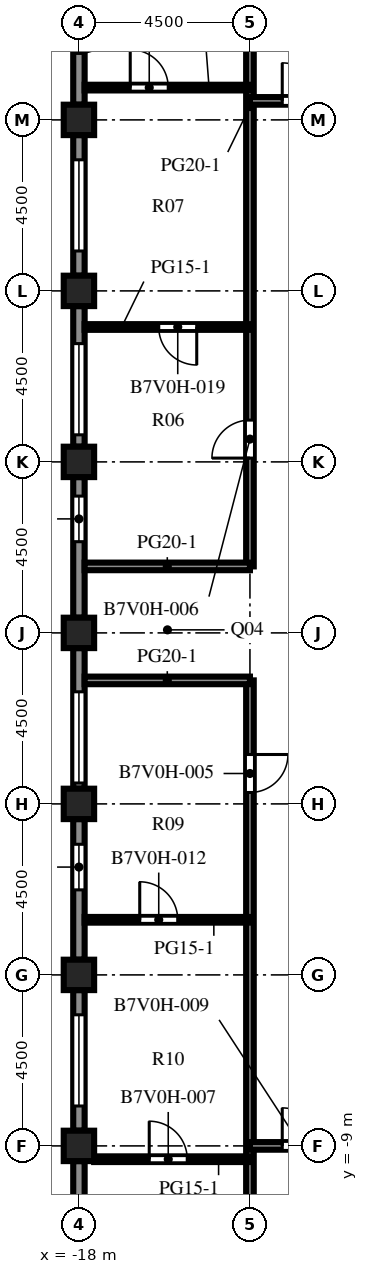
"""IFC4 building model, lengths in metres.
Left out: names, types, materials, properties, quantities, classifications, styles, units other than length and angle.
Written with IfcOpenShell. Run it as: python <this file> out.ifc"""

import sys

from ifc_helpers import new_model, si_unit, direction, frame, frame_2d, origin, origin_2d, place, context, subcontext, project, spatial, rectangle, extrude, element, fill, save


model = new_model("IFC4")
c1 = context("Model", 3, precision=1e-05, world=origin(), true_north=direction((0.0, 1.0)))
c2 = subcontext(c1, "Body", "Model", "MODEL_VIEW")
j1 = project(units=[si_unit("LENGTHUNIT", "METRE"), si_unit("PLANEANGLEUNIT", "RADIAN")], contexts=[c1])
p1 = place(None, origin())
s1 = spatial("IfcSite", under=j1, at=p1, CompositionType="ELEMENT")
p2 = place(p1, origin())
s2 = spatial("IfcBuilding", under=s1, at=p2, CompositionType="ELEMENT")
p3 = place(p2, frame((0.0, 0.0, 231.6)))
s3 = spatial("IfcBuildingStorey", under=s2, at=p3, CompositionType="ELEMENT", Elevation=231.6)
for number, where, z_axis, x_axis in (
    (1, (-18.0, -9.0, 0.0), (0.0, 0.0, 1.0), (1.0, 0.0, 0.0)),
    (2, (-18.0, -4.5, 0.0), (0.0, 0.0, 1.0), (1.0, 0.0, 0.0)),
    (3, (-18.0, 0.0, 0.0), (0.0, 0.0, 1.0), (1.0, 0.0, 0.0)),
    (4, (-18.0, 4.5, 0.0), (0.0, 0.0, 1.0), (1.0, 0.0, 0.0)),
    (5, (-18.0, 9.0, 0.0), (0.0, 0.0, 1.0), (1.0, 0.0, 0.0)),
    (6, (-18.0, 13.5, 0.0), (0.0, 0.0, 1.0), (1.0, 0.0, 0.0)),
    (7, (-18.0, 18.0, 0.0), (0.0, 0.0, 1.0), (1.0, 0.0, 0.0)),
):
    element("IfcColumn", number, at=place(p3, frame(where, z_axis=z_axis, x_axis=x_axis)), inside=s3, PredefinedType="COLUMN", context=c2, shape_type="SweptSolid", body=[
        extrude(rectangle(XDim=0.8, YDim=0.8, at=origin_2d()), origin(), (0.0, 0.0, 1.0), 4.1),
    ])
p4 = place(p3, frame((-18.0, 18.4, 0.0), z_axis=(0.0, 0.0, 1.0), x_axis=(0.0, 1.0, 0.0)))
e8 = element("IfcWall", 8, at=p4, inside=s3, PredefinedType="SOLIDWALL", context=c2, shape_type="SweptSolid", body=[
    extrude(rectangle(XDim=3.7, YDim=0.3, at=frame_2d((1.85, 0.0))), origin(), (0.0, 0.0, 1.0), 2.85),
])
p5 = place(p4, frame((1.35, 0.0, 0.0)))
e9 = element("IfcOpeningElement", 9, at=p5, cuts=e8, PredefinedType="OPENING", context=c2, shape_type="SweptSolid", body=[
    extrude(rectangle(XDim=1.0, YDim=2.2, at=frame_2d((0.5, 1.1))), frame((0.0, 0.16, 0.0), z_axis=(0.0, -1.0, 0.0), x_axis=(1.0, 0.0, 0.0)), (0.0, 0.0, 1.0), 0.32),
])
p6 = place(p3, frame((-18.0, 13.9, 0.0), z_axis=(0.0, 0.0, 1.0), x_axis=(0.0, 1.0, 0.0)))
e10 = element("IfcWall", 10, at=p6, inside=s3, PredefinedType="SOLIDWALL", context=c2, shape_type="SweptSolid", body=[
    extrude(rectangle(XDim=3.7, YDim=0.3, at=frame_2d((1.85, 0.0))), origin(), (0.0, 0.0, 1.0), 2.85),
])
p7 = place(p6, frame((0.65, 0.0, 0.8)))
e11 = element("IfcOpeningElement", 11, at=p7, cuts=e10, PredefinedType="OPENING", context=c2, shape_type="SweptSolid", body=[
    extrude(rectangle(XDim=2.4, YDim=1.7, at=frame_2d((1.2, 0.85))), frame((0.0, 0.16, 0.0), z_axis=(0.0, -1.0, 0.0), x_axis=(1.0, 0.0, 0.0)), (0.0, 0.0, 1.0), 0.32),
])
p8 = place(p3, frame((-18.0, 9.4, 0.0), z_axis=(0.0, 0.0, 1.0), x_axis=(0.0, 1.0, 0.0)))
e12 = element("IfcWall", 12, at=p8, inside=s3, PredefinedType="SOLIDWALL", context=c2, shape_type="SweptSolid", body=[
    extrude(rectangle(XDim=3.7, YDim=0.3, at=frame_2d((1.85, 0.0))), origin(), (0.0, 0.0, 1.0), 2.85),
])
p9 = place(p8, frame((0.312, 0.0, 0.8)))
e13 = element("IfcOpeningElement", 13, at=p9, cuts=e12, PredefinedType="OPENING", context=c2, shape_type="SweptSolid", body=[
    extrude(rectangle(XDim=2.4, YDim=1.7, at=frame_2d((1.2, 0.85))), frame((0.0, 0.16, 0.0), z_axis=(0.0, -1.0, 0.0), x_axis=(1.0, 0.0, 0.0)), (0.0, 0.0, 1.0), 0.32),
])
p10 = place(p3, frame((-18.0, 4.9, 0.0), z_axis=(0.0, 0.0, 1.0), x_axis=(0.0, 1.0, 0.0)))
e14 = element("IfcWall", 14, at=p10, inside=s3, PredefinedType="SOLIDWALL", context=c2, shape_type="SweptSolid", body=[
    extrude(rectangle(XDim=3.7, YDim=0.3, at=frame_2d((1.85, 0.0))), origin(), (0.0, 0.0, 1.0), 2.85),
])
p11 = place(p10, frame((2.0, 0.0, 0.8)))
e15 = element("IfcOpeningElement", 15, at=p11, cuts=e14, PredefinedType="OPENING", context=c2, shape_type="SweptSolid", body=[
    extrude(rectangle(XDim=1.2, YDim=1.7, at=frame_2d((0.6, 0.85))), frame((0.0, 0.16, 0.0), z_axis=(0.0, -1.0, 0.0), x_axis=(1.0, 0.0, 0.0)), (0.0, 0.0, 1.0), 0.32),
])
p12 = place(p3, frame((-18.0, 0.4, 0.0), z_axis=(0.0, 0.0, 1.0), x_axis=(0.0, 1.0, 0.0)))
e16 = element("IfcWall", 16, at=p12, inside=s3, PredefinedType="SOLIDWALL", context=c2, shape_type="SweptSolid", body=[
    extrude(rectangle(XDim=3.7, YDim=0.3, at=frame_2d((1.85, 0.0))), origin(), (0.0, 0.0, 1.0), 2.85),
])
p13 = place(p12, frame((0.15, 0.0, 0.8)))
e17 = element("IfcOpeningElement", 17, at=p13, cuts=e16, PredefinedType="OPENING", context=c2, shape_type="SweptSolid", body=[
    extrude(rectangle(XDim=2.4, YDim=1.7, at=frame_2d((1.2, 0.85))), frame((0.0, 0.16, 0.0), z_axis=(0.0, -1.0, 0.0), x_axis=(1.0, 0.0, 0.0)), (0.0, 0.0, 1.0), 0.32),
])
p14 = place(p3, frame((-18.0, -4.1, 0.0), z_axis=(0.0, 0.0, 1.0), x_axis=(0.0, 1.0, 0.0)))
e18 = element("IfcWall", 18, at=p14, inside=s3, PredefinedType="SOLIDWALL", context=c2, shape_type="SweptSolid", body=[
    extrude(rectangle(XDim=3.7, YDim=0.3, at=frame_2d((1.85, 0.0))), origin(), (0.0, 0.0, 1.0), 2.85),
])
p15 = place(p14, frame((1.837, 0.0, 0.8)))
e19 = element("IfcOpeningElement", 19, at=p15, cuts=e18, PredefinedType="OPENING", context=c2, shape_type="SweptSolid", body=[
    extrude(rectangle(XDim=1.2, YDim=1.7, at=frame_2d((0.6, 0.85))), frame((0.0, 0.16, 0.0), z_axis=(0.0, -1.0, 0.0), x_axis=(1.0, 0.0, 0.0)), (0.0, 0.0, 1.0), 0.32),
])
p16 = place(p3, frame((-18.0, -8.6, 0.0), z_axis=(0.0, 0.0, 1.0), x_axis=(0.0, 1.0, 0.0)))
e20 = element("IfcWall", 20, at=p16, inside=s3, PredefinedType="SOLIDWALL", context=c2, shape_type="SweptSolid", body=[
    extrude(rectangle(XDim=3.7, YDim=0.3, at=frame_2d((1.85, 0.0))), origin(), (0.0, 0.0, 1.0), 2.85),
])
p17 = place(p16, frame((0.65, 0.0, 0.8)))
e21 = element("IfcOpeningElement", 21, at=p17, cuts=e20, PredefinedType="OPENING", context=c2, shape_type="SweptSolid", body=[
    extrude(rectangle(XDim=2.4, YDim=1.7, at=frame_2d((1.2, 0.85))), frame((0.0, 0.16, 0.0), z_axis=(0.0, -1.0, 0.0), x_axis=(1.0, 0.0, 0.0)), (0.0, 0.0, 1.0), 0.32),
])
p18 = place(p3, frame((-18.0, -13.1, 0.0), z_axis=(0.0, 0.0, 1.0), x_axis=(0.0, 1.0, 0.0)))
e22 = element("IfcWall", 22, at=p18, inside=s3, PredefinedType="SOLIDWALL", context=c2, shape_type="SweptSolid", body=[
    extrude(rectangle(XDim=3.7, YDim=0.3, at=frame_2d((1.85, 0.0))), origin(), (0.0, 0.0, 1.0), 2.85),
])
p19 = place(p18, frame((1.35, 0.0, 0.0)))
e23 = element("IfcOpeningElement", 23, at=p19, cuts=e22, PredefinedType="OPENING", context=c2, shape_type="SweptSolid", body=[
    extrude(rectangle(XDim=1.0, YDim=2.2, at=frame_2d((0.5, 1.1))), frame((0.0, 0.16, 0.0), z_axis=(0.0, -1.0, 0.0), x_axis=(1.0, 0.0, 0.0)), (0.0, 0.0, 1.0), 0.32),
])
p20 = place(p3, frame((-13.5, -22.077, 0.0), z_axis=(0.0, 0.0, 1.0), x_axis=(0.0, 1.0, 0.0)))
e24 = element("IfcWall", 24, at=p20, inside=s3, PredefinedType="PARTITIONING", context=c2, shape_type="SweptSolid", body=[
    extrude(rectangle(XDim=25.327, YDim=0.2, at=frame_2d((12.664, 0.0))), origin(), (0.0, 0.0, 1.0), 3.65),
])
p21 = place(p20, frame((22.377, 0.0, 0.0)))
e25 = element("IfcOpeningElement", 25, at=p21, cuts=e24, PredefinedType="OPENING", context=c2, shape_type="SweptSolid", body=[
    extrude(rectangle(XDim=1.0, YDim=2.1, at=frame_2d((0.5, 1.05))), frame((0.0, 0.11, 0.0), z_axis=(0.0, -1.0, 0.0), x_axis=(1.0, 0.0, 0.0)), (0.0, 0.0, 1.0), 0.22),
])
p22 = place(p3, frame((-13.5, 6.25, 0.0), z_axis=(0.0, 0.0, 1.0), x_axis=(0.0, 1.0, 0.0)))
e26 = element("IfcWall", 26, at=p22, inside=s3, PredefinedType="PARTITIONING", context=c2, shape_type="SweptSolid", body=[
    extrude(rectangle(XDim=20.35, YDim=0.2, at=frame_2d((10.175, 0.0))), origin(), (0.0, 0.0, 1.0), 3.65),
])
p23 = place(p22, frame((2.85, 0.0, 0.0)))
e27 = element("IfcOpeningElement", 27, at=p23, cuts=e26, PredefinedType="OPENING", context=c2, shape_type="SweptSolid", body=[
    extrude(rectangle(XDim=1.0, YDim=2.1, at=frame_2d((0.5, 1.05))), frame((0.0, 0.11, 0.0), z_axis=(0.0, -1.0, 0.0), x_axis=(1.0, 0.0, 0.0)), (0.0, 0.0, 1.0), 0.22),
])
p24 = place(p3, frame((-13.5, -9.35, 0.0), z_axis=(0.0, 0.0, 1.0), x_axis=(-1.0, 0.0, 0.0)))
e28 = element("IfcWall", 28, at=p24, inside=s3, PredefinedType="PARTITIONING", context=c2, shape_type="SweptSolid", body=[
    extrude(rectangle(XDim=4.1, YDim=0.15, at=frame_2d((2.05, 0.0))), origin(), (0.0, 0.0, 1.0), 3.65),
])
p25 = place(p24, frame((1.65, 0.0, 0.0)))
e29 = element("IfcOpeningElement", 29, at=p25, cuts=e28, PredefinedType="OPENING", context=c2, shape_type="SweptSolid", body=[
    extrude(rectangle(XDim=1.0, YDim=2.1, at=frame_2d((0.5, 1.05))), frame((0.0, 0.085, 0.0), z_axis=(0.0, -1.0, 0.0), x_axis=(1.0, 0.0, 0.0)), (0.0, 0.0, 1.0), 0.17),
])
p26 = place(p3, frame((-10.5, -9.0, 0.0), z_axis=(0.0, 0.0, 1.0), x_axis=(-1.0, 0.0, 0.0)))
e30 = element("IfcWall", 30, at=p26, inside=s3, PredefinedType="PARTITIONING", context=c2, shape_type="SweptSolid", body=[
    extrude(rectangle(XDim=3.0, YDim=0.2, at=frame_2d((1.5, 0.0))), origin(), (0.0, 0.0, 1.0), 3.65),
])
p27 = place(p26, frame((1.15, 0.0, 0.0)))
e31 = element("IfcOpeningElement", 31, at=p27, cuts=e30, PredefinedType="OPENING", context=c2, shape_type="SweptSolid", body=[
    extrude(rectangle(XDim=1.0, YDim=2.1, at=frame_2d((0.5, 1.05))), frame((0.0, 0.11, 0.0), z_axis=(0.0, -1.0, 0.0), x_axis=(1.0, 0.0, 0.0)), (0.0, 0.0, 1.0), 0.22),
])
p28 = place(p3, frame((-13.5, -3.05, 0.0), z_axis=(0.0, 0.0, 1.0), x_axis=(-1.0, 0.0, 0.0)))
e32 = element("IfcWall", 32, at=p28, inside=s3, PredefinedType="PARTITIONING", context=c2, shape_type="SweptSolid", body=[
    extrude(rectangle(XDim=4.35, YDim=0.15, at=frame_2d((2.175, 0.0))), origin(), (0.0, 0.0, 1.0), 3.65),
])
p29 = place(p28, frame((1.9, 0.0, 0.0)))
e33 = element("IfcOpeningElement", 33, at=p29, cuts=e32, PredefinedType="OPENING", context=c2, shape_type="SweptSolid", body=[
    extrude(rectangle(XDim=1.0, YDim=2.1, at=frame_2d((0.5, 1.05))), frame((0.0, 0.085, 0.0), z_axis=(0.0, -1.0, 0.0), x_axis=(1.0, 0.0, 0.0)), (0.0, 0.0, 1.0), 0.17),
])
for number, where, z_axis, x_axis in (
    (34, (-17.85, 3.25, 0.0), (0.0, 0.0, 1.0), (1.0, 0.0, 0.0)),
    (35, (-17.85, 6.25, 0.0), (0.0, 0.0, 1.0), (1.0, 0.0, 0.0)),
):
    element("IfcWall", number, at=place(p3, frame(where, z_axis=z_axis, x_axis=x_axis)), inside=s3, PredefinedType="PARTITIONING", context=c2, shape_type="SweptSolid", body=[
        extrude(rectangle(XDim=4.35, YDim=0.2, at=frame_2d((2.175, 0.0))), origin(), (0.0, 0.0, 1.0), 3.65),
    ])
p30 = place(p3, frame((-17.85, 12.55, 0.0), z_axis=(0.0, 0.0, 1.0), x_axis=(1.0, 0.0, 0.0)))
e36 = element("IfcWall", 36, at=p30, inside=s3, PredefinedType="PARTITIONING", context=c2, shape_type="SweptSolid", body=[
    extrude(rectangle(XDim=4.35, YDim=0.15, at=frame_2d((2.175, 0.0))), origin(), (0.0, 0.0, 1.0), 3.65),
])
p31 = place(p30, frame((1.95, 0.0, 0.0)))
e37 = element("IfcOpeningElement", 37, at=p31, cuts=e36, PredefinedType="OPENING", context=c2, shape_type="SweptSolid", body=[
    extrude(rectangle(XDim=1.0, YDim=2.1, at=frame_2d((0.5, 1.05))), frame((0.0, 0.085, 0.0), z_axis=(0.0, -1.0, 0.0), x_axis=(1.0, 0.0, 0.0)), (0.0, 0.0, 1.0), 0.17),
])
p32 = place(p3, frame((-13.5, 18.5, 0.0), z_axis=(0.0, 0.0, 1.0), x_axis=(1.0, 0.0, 0.0)))
e38 = element("IfcWall", 38, at=p32, inside=s3, PredefinedType="PARTITIONING", context=c2, shape_type="SweptSolid", body=[
    extrude(rectangle(XDim=3.0, YDim=0.2, at=frame_2d((1.5, 0.0))), origin(), (0.0, 0.0, 1.0), 3.65),
])
p33 = place(p32, frame((0.85, 0.0, 0.0)))
e39 = element("IfcOpeningElement", 39, at=p33, cuts=e38, PredefinedType="OPENING", context=c2, shape_type="SweptSolid", body=[
    extrude(rectangle(XDim=1.0, YDim=2.1, at=frame_2d((0.5, 1.05))), frame((0.0, 0.11, 0.0), z_axis=(0.0, -1.0, 0.0), x_axis=(1.0, 0.0, 0.0)), (0.0, 0.0, 1.0), 0.22),
])
p34 = place(p3, frame((-17.85, 18.85, 0.0), z_axis=(0.0, 0.0, 1.0), x_axis=(1.0, 0.0, 0.0)))
e40 = element("IfcWall", 40, at=p34, inside=s3, PredefinedType="PARTITIONING", context=c2, shape_type="SweptSolid", body=[
    extrude(rectangle(XDim=4.35, YDim=0.15, at=frame_2d((2.175, 0.0))), origin(), (0.0, 0.0, 1.0), 3.65),
])
p35 = place(p34, frame((1.2, 0.0, 0.0)))
e41 = element("IfcOpeningElement", 41, at=p35, cuts=e40, PredefinedType="OPENING", context=c2, shape_type="SweptSolid", body=[
    extrude(rectangle(XDim=1.0, YDim=2.1, at=frame_2d((0.5, 1.05))), frame((0.0, 0.085, 0.0), z_axis=(0.0, -1.0, 0.0), x_axis=(1.0, 0.0, 0.0)), (0.0, 0.0, 1.0), 0.17),
])
p36 = place(p5, origin())
e42 = element("IfcDoor", 42, at=p36, inside=s3, OperationType="SINGLE_SWING_RIGHT", PredefinedType="DOOR", context=c2, shape_type="SweptSolid", body=[
    extrude(rectangle(XDim=1.0, YDim=2.2, at=frame_2d((0.5, 1.1))), frame((0.0, 0.025, 0.0), z_axis=(0.0, -1.0, 0.0), x_axis=(1.0, 0.0, 0.0)), (0.0, 0.0, 1.0), 0.05),
])
fill(e9, e42)
p37 = place(p7, origin())
e43 = element("IfcWindow", 43, at=p37, inside=s3, PartitioningType="SINGLE_PANEL", PredefinedType="WINDOW", context=c2, shape_type="SweptSolid", body=[
    extrude(rectangle(XDim=2.4, YDim=1.7, at=frame_2d((1.2, 0.85))), frame((0.0, 0.03, 0.0), z_axis=(0.0, -1.0, 0.0), x_axis=(1.0, 0.0, 0.0)), (0.0, 0.0, 1.0), 0.06),
])
fill(e11, e43)
p38 = place(p9, origin())
e44 = element("IfcWindow", 44, at=p38, inside=s3, PartitioningType="SINGLE_PANEL", PredefinedType="WINDOW", context=c2, shape_type="SweptSolid", body=[
    extrude(rectangle(XDim=2.4, YDim=1.7, at=frame_2d((1.2, 0.85))), frame((0.0, 0.03, 0.0), z_axis=(0.0, -1.0, 0.0), x_axis=(1.0, 0.0, 0.0)), (0.0, 0.0, 1.0), 0.06),
])
fill(e13, e44)
p39 = place(p11, origin())
e45 = element("IfcWindow", 45, at=p39, inside=s3, PartitioningType="SINGLE_PANEL", PredefinedType="WINDOW", context=c2, shape_type="SweptSolid", body=[
    extrude(rectangle(XDim=1.2, YDim=1.7, at=frame_2d((0.6, 0.85))), frame((0.0, 0.03, 0.0), z_axis=(0.0, -1.0, 0.0), x_axis=(1.0, 0.0, 0.0)), (0.0, 0.0, 1.0), 0.06),
])
fill(e15, e45)
p40 = place(p13, origin())
e46 = element("IfcWindow", 46, at=p40, inside=s3, PartitioningType="SINGLE_PANEL", PredefinedType="WINDOW", context=c2, shape_type="SweptSolid", body=[
    extrude(rectangle(XDim=2.4, YDim=1.7, at=frame_2d((1.2, 0.85))), frame((0.0, 0.03, 0.0), z_axis=(0.0, -1.0, 0.0), x_axis=(1.0, 0.0, 0.0)), (0.0, 0.0, 1.0), 0.06),
])
fill(e17, e46)
p41 = place(p15, origin())
e47 = element("IfcWindow", 47, at=p41, inside=s3, PartitioningType="SINGLE_PANEL", PredefinedType="WINDOW", context=c2, shape_type="SweptSolid", body=[
    extrude(rectangle(XDim=1.2, YDim=1.7, at=frame_2d((0.6, 0.85))), frame((0.0, 0.03, 0.0), z_axis=(0.0, -1.0, 0.0), x_axis=(1.0, 0.0, 0.0)), (0.0, 0.0, 1.0), 0.06),
])
fill(e19, e47)
p42 = place(p17, origin())
e48 = element("IfcWindow", 48, at=p42, inside=s3, PartitioningType="SINGLE_PANEL", PredefinedType="WINDOW", context=c2, shape_type="SweptSolid", body=[
    extrude(rectangle(XDim=2.4, YDim=1.7, at=frame_2d((1.2, 0.85))), frame((0.0, 0.03, 0.0), z_axis=(0.0, -1.0, 0.0), x_axis=(1.0, 0.0, 0.0)), (0.0, 0.0, 1.0), 0.06),
])
fill(e21, e48)
p43 = place(p21, origin())
e49 = element("IfcDoor", 49, at=p43, inside=s3, OperationType="SINGLE_SWING_RIGHT", PredefinedType="DOOR", context=c2, shape_type="SweptSolid", body=[
    extrude(rectangle(XDim=1.0, YDim=2.1, at=frame_2d((0.5, 1.05))), frame((0.0, 0.025, 0.0), z_axis=(0.0, -1.0, 0.0), x_axis=(1.0, 0.0, 0.0)), (0.0, 0.0, 1.0), 0.05),
])
fill(e25, e49)
p44 = place(p23, origin())
e50 = element("IfcDoor", 50, at=p44, inside=s3, OperationType="SINGLE_SWING_LEFT", PredefinedType="DOOR", context=c2, shape_type="SweptSolid", body=[
    extrude(rectangle(XDim=1.0, YDim=2.1, at=frame_2d((0.5, 1.05))), frame((0.0, 0.025, 0.0), z_axis=(0.0, -1.0, 0.0), x_axis=(1.0, 0.0, 0.0)), (0.0, 0.0, 1.0), 0.05),
])
fill(e27, e50)
p45 = place(p25, origin())
e51 = element("IfcDoor", 51, at=p45, inside=s3, OperationType="SINGLE_SWING_RIGHT", PredefinedType="DOOR", context=c2, shape_type="SweptSolid", body=[
    extrude(rectangle(XDim=1.0, YDim=2.1, at=frame_2d((0.5, 1.05))), frame((0.0, 0.025, 0.0), z_axis=(0.0, -1.0, 0.0), x_axis=(1.0, 0.0, 0.0)), (0.0, 0.0, 1.0), 0.05),
])
fill(e29, e51)
p46 = place(p27, origin())
e52 = element("IfcDoor", 52, at=p46, inside=s3, OperationType="SINGLE_SWING_RIGHT", PredefinedType="DOOR", context=c2, shape_type="SweptSolid", body=[
    extrude(rectangle(XDim=1.0, YDim=2.1, at=frame_2d((0.5, 1.05))), frame((0.0, 0.025, 0.0), z_axis=(0.0, -1.0, 0.0), x_axis=(1.0, 0.0, 0.0)), (0.0, 0.0, 1.0), 0.05),
])
fill(e31, e52)
p47 = place(p29, origin())
e53 = element("IfcDoor", 53, at=p47, inside=s3, OperationType="SINGLE_SWING_RIGHT", PredefinedType="DOOR", context=c2, shape_type="SweptSolid", body=[
    extrude(rectangle(XDim=1.0, YDim=2.1, at=frame_2d((0.5, 1.05))), frame((0.0, 0.025, 0.0), z_axis=(0.0, -1.0, 0.0), x_axis=(1.0, 0.0, 0.0)), (0.0, 0.0, 1.0), 0.05),
])
fill(e33, e53)
p48 = place(p31, origin())
e54 = element("IfcDoor", 54, at=p48, inside=s3, OperationType="SINGLE_SWING_RIGHT", PredefinedType="DOOR", context=c2, shape_type="SweptSolid", body=[
    extrude(rectangle(XDim=1.0, YDim=2.1, at=frame_2d((0.5, 1.05))), frame((0.0, 0.025, 0.0), z_axis=(0.0, -1.0, 0.0), x_axis=(1.0, 0.0, 0.0)), (0.0, 0.0, 1.0), 0.05),
])
fill(e37, e54)
p49 = place(p33, origin())
e55 = element("IfcDoor", 55, at=p49, inside=s3, OperationType="SINGLE_SWING_LEFT", PredefinedType="DOOR", context=c2, shape_type="SweptSolid", body=[
    extrude(rectangle(XDim=1.0, YDim=2.1, at=frame_2d((0.5, 1.05))), frame((0.0, 0.025, 0.0), z_axis=(0.0, -1.0, 0.0), x_axis=(1.0, 0.0, 0.0)), (0.0, 0.0, 1.0), 0.05),
])
fill(e39, e55)
p50 = place(p35, origin())
e56 = element("IfcDoor", 56, at=p50, inside=s3, OperationType="SINGLE_SWING_LEFT", PredefinedType="DOOR", context=c2, shape_type="SweptSolid", body=[
    extrude(rectangle(XDim=1.0, YDim=2.1, at=frame_2d((0.5, 1.05))), frame((0.0, 0.025, 0.0), z_axis=(0.0, -1.0, 0.0), x_axis=(1.0, 0.0, 0.0)), (0.0, 0.0, 1.0), 0.05),
])
fill(e41, e56)
save(model, sys.argv[1])
